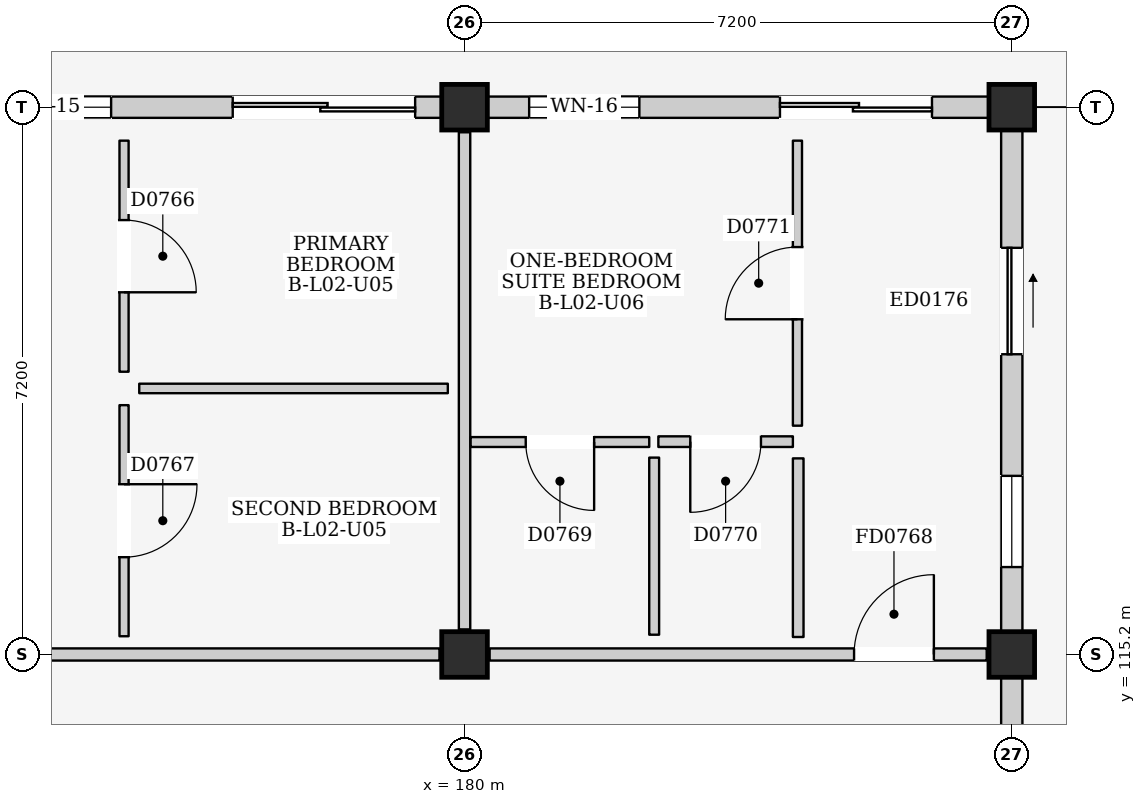
"""IFC4 building model, lengths in metres.
Left out: names, types, materials, properties, quantities, classifications, styles, units other than length and angle.
Written with IfcOpenShell. Run it as: python <this file> out.ifc"""

import sys

from ifc_helpers import new_model, si_unit, direction, frame, frame_2d, origin, origin_2d, place, context, subcontext, project, spatial, rectangle, extrude, element, fill, save


model = new_model("IFC4")
c1 = context("Model", 3, precision=1e-05, world=origin(), true_north=direction((0.0, 1.0)))
c2 = subcontext(c1, "Body", "Model", "MODEL_VIEW")
j1 = project(units=[si_unit("LENGTHUNIT", "METRE"), si_unit("PLANEANGLEUNIT", "RADIAN")], contexts=[c1])
p1 = place(None, origin())
s1 = spatial("IfcSite", under=j1, at=p1, CompositionType="ELEMENT")
p2 = place(p1, origin())
s2 = spatial("IfcBuilding", under=s1, at=p2, CompositionType="ELEMENT")
p3 = place(p2, frame((0.0, 0.0, 9.0)))
s3 = spatial("IfcBuildingStorey", under=s2, at=p3, CompositionType="ELEMENT", Elevation=9.0)
for number, where, z_axis, x_axis in (
    (1, (180.0, 115.2, 0.0), (0.0, 0.0, 1.0), (1.0, 0.0, 0.0)),
    (2, (180.0, 122.4, 0.0), (0.0, 0.0, 1.0), (1.0, 0.0, 0.0)),
    (3, (187.2, 115.2, 0.0), (0.0, 0.0, 1.0), (1.0, 0.0, 0.0)),
    (4, (187.2, 122.4, 0.0), (0.0, 0.0, 1.0), (1.0, 0.0, 0.0)),
):
    element("IfcColumn", number, at=place(p3, frame(where, z_axis=z_axis, x_axis=x_axis)), inside=s3, PredefinedType="COLUMN", context=c2, shape_type="SweptSolid", body=[
        extrude(rectangle(XDim=0.6, YDim=0.6, at=origin_2d()), origin(), (0.0, 0.0, 1.0), 3.2),
    ])
p4 = place(p3, frame((173.1, 122.4, 0.0), z_axis=(0.0, 0.0, 1.0), x_axis=(1.0, 0.0, 0.0)))
e5 = element("IfcWall", 5, at=p4, inside=s3, PredefinedType="ELEMENTEDWALL", context=c2, shape_type="SweptSolid", body=[
    extrude(rectangle(XDim=6.6, YDim=0.28, at=frame_2d((3.3, 0.0))), origin(), (0.0, 0.0, 1.0), 2.425),
])
p5 = place(p4, frame((3.85, 0.0, 0.0)))
e6 = element("IfcOpeningElement", 6, at=p5, cuts=e5, PredefinedType="OPENING", context=c2, shape_type="SweptSolid", body=[
    extrude(rectangle(XDim=2.4, YDim=2.12, at=frame_2d((1.2, 1.06))), frame((0.0, 0.155, 0.0), z_axis=(0.0, -1.0, 0.0), x_axis=(1.0, 0.0, 0.0)), (0.0, 0.0, 1.0), 0.31),
])
p6 = place(p4, frame((0.55, 0.0, 0.865)))
e7 = element("IfcOpeningElement", 7, at=p6, cuts=e5, PredefinedType="OPENING", context=c2, shape_type="SweptSolid", body=[
    extrude(rectangle(XDim=1.7, YDim=1.45, at=frame_2d((0.85, 0.725))), frame((0.0, 0.155, 0.0), z_axis=(0.0, -1.0, 0.0), x_axis=(1.0, 0.0, 0.0)), (0.0, 0.0, 1.0), 0.31),
])
p7 = place(p3, frame((187.2, 108.3, 0.0), z_axis=(0.0, 0.0, 1.0), x_axis=(0.0, 1.0, 0.0)))
e8 = element("IfcWall", 8, at=p7, inside=s3, PredefinedType="ELEMENTEDWALL", context=c2, shape_type="SweptSolid", body=[
    extrude(rectangle(XDim=6.6, YDim=0.28, at=frame_2d((3.3, 0.0))), origin(), (0.0, 0.0, 1.0), 2.425),
])
p8 = place(p7, frame((3.65, 0.0, 0.0)))
e9 = element("IfcOpeningElement", 9, at=p8, cuts=e8, PredefinedType="OPENING", context=c2, shape_type="SweptSolid", body=[
    extrude(rectangle(XDim=1.4, YDim=2.1, at=frame_2d((0.7, 1.05))), frame((0.0, 0.155, 0.0), z_axis=(0.0, -1.0, 0.0), x_axis=(1.0, 0.0, 0.0)), (0.0, 0.0, 1.0), 0.31),
])
p9 = place(p3, frame((180.3, 122.4, 0.0), z_axis=(0.0, 0.0, 1.0), x_axis=(1.0, 0.0, 0.0)))
e10 = element("IfcWall", 10, at=p9, inside=s3, PredefinedType="ELEMENTEDWALL", context=c2, shape_type="SweptSolid", body=[
    extrude(rectangle(XDim=6.6, YDim=0.28, at=frame_2d((3.3, 0.0))), origin(), (0.0, 0.0, 1.0), 2.425),
])
p10 = place(p9, frame((3.85, 0.0, 0.0)))
e11 = element("IfcOpeningElement", 11, at=p10, cuts=e10, PredefinedType="OPENING", context=c2, shape_type="SweptSolid", body=[
    extrude(rectangle(XDim=2.0, YDim=2.12, at=frame_2d((1.0, 1.06))), frame((0.0, 0.155, 0.0), z_axis=(0.0, -1.0, 0.0), x_axis=(1.0, 0.0, 0.0)), (0.0, 0.0, 1.0), 0.31),
])
p11 = place(p9, frame((0.55, 0.0, 0.9)))
e12 = element("IfcOpeningElement", 12, at=p11, cuts=e10, PredefinedType="OPENING", context=c2, shape_type="SweptSolid", body=[
    extrude(rectangle(XDim=1.45, YDim=1.4, at=frame_2d((0.725, 0.7))), frame((0.0, 0.155, 0.0), z_axis=(0.0, -1.0, 0.0), x_axis=(1.0, 0.0, 0.0)), (0.0, 0.0, 1.0), 0.31),
])
p12 = place(p3, frame((187.2, 115.5, 0.0), z_axis=(0.0, 0.0, 1.0), x_axis=(0.0, 1.0, 0.0)))
e13 = element("IfcWall", 13, at=p12, inside=s3, PredefinedType="ELEMENTEDWALL", context=c2, shape_type="SweptSolid", body=[
    extrude(rectangle(XDim=6.6, YDim=0.28, at=frame_2d((3.3, 0.0))), origin(), (0.0, 0.0, 1.0), 2.425),
])
p13 = place(p12, frame((3.65, 0.0, 0.0)))
e14 = element("IfcOpeningElement", 14, at=p13, cuts=e13, PredefinedType="OPENING", context=c2, shape_type="SweptSolid", body=[
    extrude(rectangle(XDim=1.4, YDim=2.1, at=frame_2d((0.7, 1.05))), frame((0.0, 0.155, 0.0), z_axis=(0.0, -1.0, 0.0), x_axis=(1.0, 0.0, 0.0)), (0.0, 0.0, 1.0), 0.31),
])
p14 = place(p12, frame((0.85, 0.0, 0.95)))
e15 = element("IfcOpeningElement", 15, at=p14, cuts=e13, PredefinedType="OPENING", context=c2, shape_type="SweptSolid", body=[
    extrude(rectangle(XDim=1.2, YDim=1.35, at=frame_2d((0.6, 0.675))), frame((0.0, 0.155, 0.0), z_axis=(0.0, -1.0, 0.0), x_axis=(1.0, 0.0, 0.0)), (0.0, 0.0, 1.0), 0.31),
])
p15 = place(p3, frame((173.13, 115.2, 0.0), z_axis=(0.0, 0.0, 1.0), x_axis=(1.0, 0.0, 0.0)))
e16 = element("IfcWall", 16, at=p15, inside=s3, PredefinedType="PARTITIONING", context=c2, shape_type="SweptSolid", body=[
    extrude(rectangle(XDim=6.54, YDim=0.16, at=frame_2d((3.27, 0.0))), origin(), (0.0, 0.0, 1.0), 2.345),
])
p16 = place(p15, frame((0.18, 0.0, 0.0)))
e17 = element("IfcOpeningElement", 17, at=p16, cuts=e16, PredefinedType="OPENING", context=c2, shape_type="SweptSolid", body=[
    extrude(rectangle(XDim=1.05, YDim=2.15, at=frame_2d((0.525, 1.075))), frame((0.0, 0.095, 0.0), z_axis=(0.0, -1.0, 0.0), x_axis=(1.0, 0.0, 0.0)), (0.0, 0.0, 1.0), 0.19),
])
p17 = place(p3, frame((180.0, 115.53, 0.0), z_axis=(0.0, 0.0, 1.0), x_axis=(0.0, 1.0, 0.0)))
e18 = element("IfcWall", 18, at=p17, inside=s3, PredefinedType="PARTITIONING", context=c2, shape_type="SweptSolid", body=[
    extrude(rectangle(XDim=6.54, YDim=0.15, at=frame_2d((3.27, 0.0))), origin(), (0.0, 0.0, 1.0), 2.395),
])
p18 = place(p3, frame((175.52, 118.92, 0.0), z_axis=(0.0, 0.0, 1.0), x_axis=(0.0, 1.0, 0.0)))
e19 = element("IfcWall", 19, at=p18, inside=s3, PredefinedType="PARTITIONING", context=c2, shape_type="SweptSolid", body=[
    extrude(rectangle(XDim=3.04, YDim=0.12, at=frame_2d((1.52, 0.0))), origin(), (0.0, 0.0, 1.0), 2.96),
])
p19 = place(p18, frame((1.045, 0.0, 0.0)))
e20 = element("IfcOpeningElement", 20, at=p19, cuts=e19, PredefinedType="OPENING", context=c2, shape_type="SweptSolid", body=[
    extrude(rectangle(XDim=0.95, YDim=2.15, at=frame_2d((0.475, 1.075))), frame((0.0, 0.075, 0.0), z_axis=(0.0, -1.0, 0.0), x_axis=(1.0, 0.0, 0.0)), (0.0, 0.0, 1.0), 0.15),
])
p20 = place(p3, frame((175.72, 118.7, 0.0), z_axis=(0.0, 0.0, 1.0), x_axis=(1.0, 0.0, 0.0)))
e21 = element("IfcWall", 21, at=p20, inside=s3, PredefinedType="PARTITIONING", context=c2, shape_type="SweptSolid", body=[
    extrude(rectangle(XDim=4.06, YDim=0.125, at=frame_2d((2.03, 0.0))), origin(), (0.0, 0.0, 1.0), 2.96),
])
p21 = place(p3, frame((175.52, 115.44, 0.0), z_axis=(0.0, 0.0, 1.0), x_axis=(0.0, 1.0, 0.0)))
e22 = element("IfcWall", 22, at=p21, inside=s3, PredefinedType="PARTITIONING", context=c2, shape_type="SweptSolid", body=[
    extrude(rectangle(XDim=3.04, YDim=0.12, at=frame_2d((1.52, 0.0))), origin(), (0.0, 0.0, 1.0), 2.96),
])
p22 = place(p21, frame((1.04, 0.0, 0.0)))
e23 = element("IfcOpeningElement", 23, at=p22, cuts=e22, PredefinedType="OPENING", context=c2, shape_type="SweptSolid", body=[
    extrude(rectangle(XDim=0.96, YDim=2.15, at=frame_2d((0.48, 1.075))), frame((0.0, 0.075, 0.0), z_axis=(0.0, -1.0, 0.0), x_axis=(1.0, 0.0, 0.0)), (0.0, 0.0, 1.0), 0.15),
])
p23 = place(p3, frame((180.33, 115.2, 0.0), z_axis=(0.0, 0.0, 1.0), x_axis=(1.0, 0.0, 0.0)))
e24 = element("IfcWall", 24, at=p23, inside=s3, PredefinedType="PARTITIONING", context=c2, shape_type="SweptSolid", body=[
    extrude(rectangle(XDim=6.54, YDim=0.16, at=frame_2d((3.27, 0.0))), origin(), (0.0, 0.0, 1.0), 2.345),
])
p24 = place(p23, frame((4.795, 0.0, 0.0)))
e25 = element("IfcOpeningElement", 25, at=p24, cuts=e24, PredefinedType="OPENING", context=c2, shape_type="SweptSolid", body=[
    extrude(rectangle(XDim=1.05, YDim=2.15, at=frame_2d((0.525, 1.075))), frame((0.0, 0.095, 0.0), z_axis=(0.0, -1.0, 0.0), x_axis=(1.0, 0.0, 0.0)), (0.0, 0.0, 1.0), 0.19),
])
p25 = place(p3, frame((180.08, 117.995, 0.0), z_axis=(0.0, 0.0, 1.0), x_axis=(1.0, 0.0, 0.0)))
e26 = element("IfcWall", 26, at=p25, inside=s3, PredefinedType="PARTITIONING", context=c2, shape_type="SweptSolid", body=[
    extrude(rectangle(XDim=2.35, YDim=0.13, at=frame_2d((1.175, 0.0))), origin(), (0.0, 0.0, 1.0), 2.96),
])
p26 = place(p25, frame((0.725, 0.0, 0.0)))
e27 = element("IfcOpeningElement", 27, at=p26, cuts=e26, PredefinedType="OPENING", context=c2, shape_type="SweptSolid", body=[
    extrude(rectangle(XDim=0.9, YDim=2.1, at=frame_2d((0.45, 1.05))), frame((0.0, 0.08, 0.0), z_axis=(0.0, -1.0, 0.0), x_axis=(1.0, 0.0, 0.0)), (0.0, 0.0, 1.0), 0.16),
])
p27 = place(p3, frame((182.495, 115.46, 0.0), z_axis=(0.0, 0.0, 1.0), x_axis=(0.0, 1.0, 0.0)))
e28 = element("IfcWall", 28, at=p27, inside=s3, PredefinedType="PARTITIONING", context=c2, shape_type="SweptSolid", body=[
    extrude(rectangle(XDim=2.33, YDim=0.13, at=frame_2d((1.165, 0.0))), origin(), (0.0, 0.0, 1.0), 2.96),
])
p28 = place(p3, frame((182.55, 118.0, 0.0), z_axis=(0.0, 0.0, 1.0), x_axis=(1.0, 0.0, 0.0)))
e29 = element("IfcWall", 29, at=p28, inside=s3, PredefinedType="PARTITIONING", context=c2, shape_type="SweptSolid", body=[
    extrude(rectangle(XDim=1.77, YDim=0.14, at=frame_2d((0.885, 0.0))), origin(), (0.0, 0.0, 1.0), 2.96),
])
p29 = place(p28, frame((0.42, 0.0, 0.0)))
e30 = element("IfcOpeningElement", 30, at=p29, cuts=e29, PredefinedType="OPENING", context=c2, shape_type="SweptSolid", body=[
    extrude(rectangle(XDim=0.93, YDim=2.14, at=frame_2d((0.465, 1.07))), frame((0.0, 0.085, 0.0), z_axis=(0.0, -1.0, 0.0), x_axis=(1.0, 0.0, 0.0)), (0.0, 0.0, 1.0), 0.17),
])
p30 = place(p3, frame((184.39, 115.43, 0.0), z_axis=(0.0, 0.0, 1.0), x_axis=(0.0, 1.0, 0.0)))
e31 = element("IfcWall", 31, at=p30, inside=s3, PredefinedType="PARTITIONING", context=c2, shape_type="SweptSolid", body=[
    extrude(rectangle(XDim=2.35, YDim=0.14, at=frame_2d((1.175, 0.0))), origin(), (0.0, 0.0, 1.0), 2.96),
])
p31 = place(p3, frame((184.38, 118.21, 0.0), z_axis=(0.0, 0.0, 1.0), x_axis=(0.0, 1.0, 0.0)))
e32 = element("IfcWall", 32, at=p31, inside=s3, PredefinedType="PARTITIONING", context=c2, shape_type="SweptSolid", body=[
    extrude(rectangle(XDim=3.75, YDim=0.12, at=frame_2d((1.875, 0.0))), origin(), (0.0, 0.0, 1.0), 2.96),
])
p32 = place(p31, frame((1.4, 0.0, 0.0)))
e33 = element("IfcOpeningElement", 33, at=p32, cuts=e32, PredefinedType="OPENING", context=c2, shape_type="SweptSolid", body=[
    extrude(rectangle(XDim=0.95, YDim=2.15, at=frame_2d((0.475, 1.075))), frame((0.0, 0.075, 0.0), z_axis=(0.0, -1.0, 0.0), x_axis=(1.0, 0.0, 0.0)), (0.0, 0.0, 1.0), 0.15),
])
p33 = place(p5, frame((2.4, 0.0, 0.0), z_axis=(0.0, 0.0, 1.0), x_axis=(-1.0, 0.0, 0.0)))
e34 = element("IfcDoor", 34, at=p33, inside=s3, OperationType="DOUBLE_DOOR_SLIDING", PredefinedType="DOOR", context=c2, shape_type="SweptSolid", body=[
    extrude(rectangle(XDim=2.4, YDim=2.12, at=frame_2d((1.2, 1.06))), frame((0.0, 0.025, 0.0), z_axis=(0.0, -1.0, 0.0), x_axis=(1.0, 0.0, 0.0)), (0.0, 0.0, 1.0), 0.05),
])
fill(e6, e34)
p34 = place(p6, origin())
e35 = element("IfcWindow", 35, at=p34, inside=s3, PartitioningType="DOUBLE_PANEL_VERTICAL", PredefinedType="WINDOW", context=c2, shape_type="SweptSolid", body=[
    extrude(rectangle(XDim=1.7, YDim=1.45, at=frame_2d((0.85, 0.725))), frame((0.0, 0.03, 0.0), z_axis=(0.0, -1.0, 0.0), x_axis=(1.0, 0.0, 0.0)), (0.0, 0.0, 1.0), 0.06),
])
fill(e7, e35)
p35 = place(p10, frame((2.0, 0.0, 0.0), z_axis=(0.0, 0.0, 1.0), x_axis=(-1.0, 0.0, 0.0)))
e36 = element("IfcDoor", 36, at=p35, inside=s3, OperationType="DOUBLE_DOOR_SLIDING", PredefinedType="DOOR", context=c2, shape_type="SweptSolid", body=[
    extrude(rectangle(XDim=2.0, YDim=2.12, at=frame_2d((1.0, 1.06))), frame((0.0, 0.025, 0.0), z_axis=(0.0, -1.0, 0.0), x_axis=(1.0, 0.0, 0.0)), (0.0, 0.0, 1.0), 0.05),
])
fill(e11, e36)
p36 = place(p11, origin())
e37 = element("IfcWindow", 37, at=p36, inside=s3, PartitioningType="DOUBLE_PANEL_VERTICAL", PredefinedType="WINDOW", context=c2, shape_type="SweptSolid", body=[
    extrude(rectangle(XDim=1.45, YDim=1.4, at=frame_2d((0.725, 0.7))), frame((0.0, 0.03, 0.0), z_axis=(0.0, -1.0, 0.0), x_axis=(1.0, 0.0, 0.0)), (0.0, 0.0, 1.0), 0.06),
])
fill(e12, e37)
p37 = place(p13, frame((1.4, 0.0, 0.0), z_axis=(0.0, 0.0, 1.0), x_axis=(-1.0, 0.0, 0.0)))
e38 = element("IfcDoor", 38, at=p37, inside=s3, OperationType="SLIDING_TO_RIGHT", PredefinedType="DOOR", context=c2, shape_type="SweptSolid", body=[
    extrude(rectangle(XDim=1.4, YDim=2.1, at=frame_2d((0.7, 1.05))), frame((0.0, 0.025, 0.0), z_axis=(0.0, -1.0, 0.0), x_axis=(1.0, 0.0, 0.0)), (0.0, 0.0, 1.0), 0.05),
])
fill(e14, e38)
p38 = place(p14, origin())
e39 = element("IfcWindow", 39, at=p38, inside=s3, PartitioningType="SINGLE_PANEL", PredefinedType="WINDOW", context=c2, shape_type="SweptSolid", body=[
    extrude(rectangle(XDim=1.2, YDim=1.35, at=frame_2d((0.6, 0.675))), frame((0.0, 0.03, 0.0), z_axis=(0.0, -1.0, 0.0), x_axis=(1.0, 0.0, 0.0)), (0.0, 0.0, 1.0), 0.06),
])
fill(e15, e39)
p39 = place(p19, frame((0.95, 0.0, 0.0), z_axis=(0.0, 0.0, 1.0), x_axis=(-1.0, 0.0, 0.0)))
e40 = element("IfcDoor", 40, at=p39, inside=s3, OperationType="SINGLE_SWING_RIGHT", PredefinedType="DOOR", context=c2, shape_type="SweptSolid", body=[
    extrude(rectangle(XDim=0.95, YDim=2.15, at=frame_2d((0.475, 1.075))), frame((0.0, 0.025, 0.0), z_axis=(0.0, -1.0, 0.0), x_axis=(1.0, 0.0, 0.0)), (0.0, 0.0, 1.0), 0.05),
])
fill(e20, e40)
p40 = place(p22, frame((0.96, 0.0, 0.0), z_axis=(0.0, 0.0, 1.0), x_axis=(-1.0, 0.0, 0.0)))
e41 = element("IfcDoor", 41, at=p40, inside=s3, OperationType="SINGLE_SWING_LEFT", PredefinedType="DOOR", context=c2, shape_type="SweptSolid", body=[
    extrude(rectangle(XDim=0.96, YDim=2.15, at=frame_2d((0.48, 1.075))), frame((0.0, 0.025, 0.0), z_axis=(0.0, -1.0, 0.0), x_axis=(1.0, 0.0, 0.0)), (0.0, 0.0, 1.0), 0.05),
])
fill(e23, e41)
p41 = place(p24, origin())
e42 = element("IfcDoor", 42, at=p41, inside=s3, OperationType="SINGLE_SWING_RIGHT", PredefinedType="DOOR", context=c2, shape_type="SweptSolid", body=[
    extrude(rectangle(XDim=1.05, YDim=2.15, at=frame_2d((0.525, 1.075))), frame((0.0, 0.025, 0.0), z_axis=(0.0, -1.0, 0.0), x_axis=(1.0, 0.0, 0.0)), (0.0, 0.0, 1.0), 0.05),
])
fill(e25, e42)
p42 = place(p26, frame((0.9, 0.0, 0.0), z_axis=(0.0, 0.0, 1.0), x_axis=(-1.0, 0.0, 0.0)))
e43 = element("IfcDoor", 43, at=p42, inside=s3, OperationType="SINGLE_SWING_LEFT", PredefinedType="DOOR", context=c2, shape_type="SweptSolid", body=[
    extrude(rectangle(XDim=0.9, YDim=2.1, at=frame_2d((0.45, 1.05))), frame((0.0, 0.025, 0.0), z_axis=(0.0, -1.0, 0.0), x_axis=(1.0, 0.0, 0.0)), (0.0, 0.0, 1.0), 0.05),
])
fill(e27, e43)
p43 = place(p29, frame((0.93, 0.0, 0.0), z_axis=(0.0, 0.0, 1.0), x_axis=(-1.0, 0.0, 0.0)))
e44 = element("IfcDoor", 44, at=p43, inside=s3, OperationType="SINGLE_SWING_RIGHT", PredefinedType="DOOR", context=c2, shape_type="SweptSolid", body=[
    extrude(rectangle(XDim=0.93, YDim=2.14, at=frame_2d((0.465, 1.07))), frame((0.0, 0.025, 0.0), z_axis=(0.0, -1.0, 0.0), x_axis=(1.0, 0.0, 0.0)), (0.0, 0.0, 1.0), 0.05),
])
fill(e30, e44)
p44 = place(p32, origin())
e45 = element("IfcDoor", 45, at=p44, inside=s3, OperationType="SINGLE_SWING_LEFT", PredefinedType="DOOR", context=c2, shape_type="SweptSolid", body=[
    extrude(rectangle(XDim=0.95, YDim=2.15, at=frame_2d((0.475, 1.075))), frame((0.0, 0.025, 0.0), z_axis=(0.0, -1.0, 0.0), x_axis=(1.0, 0.0, 0.0)), (0.0, 0.0, 1.0), 0.05),
])
fill(e33, e45)
save(model, sys.argv[1])
